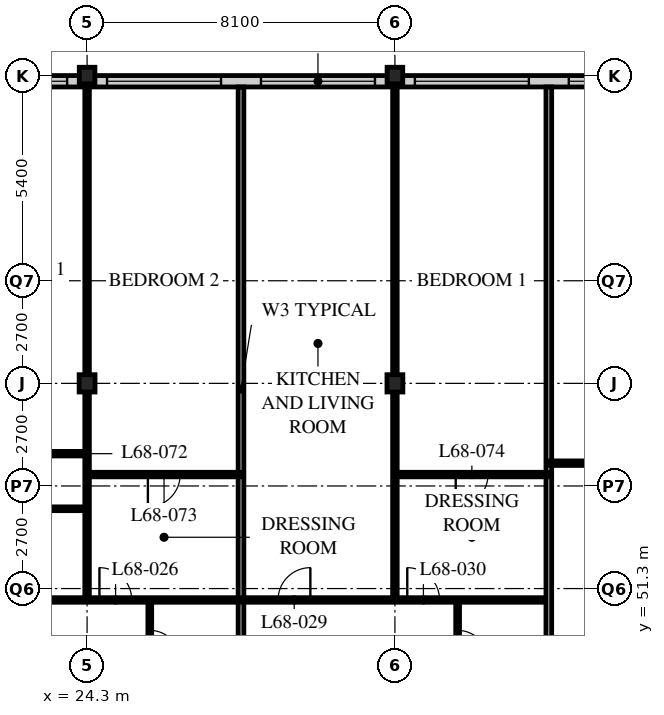
"""IFC4 building model, lengths in metres.
Left out: names, types, materials, properties, quantities, classifications, styles, units other than length and angle.
Written with IfcOpenShell. Run it as: python <this file> out.ifc"""

import sys

from ifc_helpers import new_model, si_unit, direction, frame, frame_2d, origin, origin_2d, place, context, subcontext, project, spatial, rectangle, i_section, extrude, element, fill, save


model = new_model("IFC4")
c1 = context("Model", 3, precision=1e-05, world=origin(), true_north=direction((0.0, 1.0)))
c2 = subcontext(c1, "Body", "Model", "MODEL_VIEW")
j1 = project(units=[si_unit("LENGTHUNIT", "METRE"), si_unit("PLANEANGLEUNIT", "RADIAN")], contexts=[c1])
p1 = place(None, origin())
s1 = spatial("IfcSite", under=j1, at=p1, CompositionType="ELEMENT")
p2 = place(p1, origin())
s2 = spatial("IfcBuilding", under=s1, at=p2, CompositionType="ELEMENT")
p3 = place(p2, frame((0.0, 0.0, 265.8)))
s3 = spatial("IfcBuildingStorey", under=s2, at=p3, CompositionType="ELEMENT", Elevation=265.8)
p4 = place(p3, frame((24.3, 56.7, 0.0), z_axis=(0.0, 0.0, 1.0), x_axis=(1.0, 0.0, 0.0)))
e1 = element("IfcColumn", 1, at=p4, inside=s3, PredefinedType="COLUMN", context=c2, shape_type="SweptSolid", body=[
    extrude(i_section(OverallWidth=0.418, OverallDepth=0.456, WebThickness=0.042, FlangeThickness=0.067, FilletRadius=0.015, at=origin_2d()), origin(), (0.0, 0.0, 1.0), 3.9),
])
p5 = place(p3, frame((24.3, 64.8, 0.0), z_axis=(0.0, 0.0, 1.0), x_axis=(1.0, 0.0, 0.0)))
e2 = element("IfcColumn", 2, at=p5, inside=s3, PredefinedType="COLUMN", context=c2, shape_type="SweptSolid", body=[
    extrude(i_section(OverallWidth=0.412, OverallDepth=0.437, WebThickness=0.036, FlangeThickness=0.058, FilletRadius=0.015, at=origin_2d()), origin(), (0.0, 0.0, 1.0), 3.9),
])
p6 = place(p3, frame((32.4, 56.7, 0.0), z_axis=(0.0, 0.0, 1.0), x_axis=(1.0, 0.0, 0.0)))
e3 = element("IfcColumn", 3, at=p6, inside=s3, PredefinedType="COLUMN", context=c2, shape_type="SweptSolid", body=[
    extrude(i_section(OverallWidth=0.418, OverallDepth=0.456, WebThickness=0.042, FlangeThickness=0.067, FilletRadius=0.015, at=origin_2d()), origin(), (0.0, 0.0, 1.0), 3.9),
])
p7 = place(p3, frame((32.4, 64.8, 0.0), z_axis=(0.0, 0.0, 1.0), x_axis=(1.0, 0.0, 0.0)))
e4 = element("IfcColumn", 4, at=p7, inside=s3, PredefinedType="COLUMN", context=c2, shape_type="SweptSolid", body=[
    extrude(i_section(OverallWidth=0.412, OverallDepth=0.437, WebThickness=0.036, FlangeThickness=0.058, FilletRadius=0.015, at=origin_2d()), origin(), (0.0, 0.0, 1.0), 3.9),
])
p8 = place(p3, frame((48.3, 64.65, 0.0), z_axis=(0.0, 0.0, 1.0), x_axis=(-1.0, 0.0, 0.0)))
e5 = element("IfcWall", 5, at=p8, inside=s3, PredefinedType="SOLIDWALL", context=c2, shape_type="SweptSolid", body=[
    extrude(rectangle(XDim=40.2, YDim=0.3, at=frame_2d((20.1, 0.0))), origin(), (0.0, 0.0, 1.0), 3.69),
])
p9 = place(p8, frame((0.225, 0.0, 0.6)))
e6 = element("IfcOpeningElement", 6, at=p9, cuts=e5, PredefinedType="OPENING", context=c2, shape_type="SweptSolid", body=[
    extrude(rectangle(XDim=3.0, YDim=2.4, at=frame_2d((1.5, 1.2))), frame((0.0, 0.16, 0.0), z_axis=(0.0, -1.0, 0.0), x_axis=(1.0, 0.0, 0.0)), (0.0, 0.0, 1.0), 0.32),
])
p10 = place(p8, frame((4.275, 0.0, 0.6)))
e7 = element("IfcOpeningElement", 7, at=p10, cuts=e5, PredefinedType="OPENING", context=c2, shape_type="SweptSolid", body=[
    extrude(rectangle(XDim=3.0, YDim=2.4, at=frame_2d((1.5, 1.2))), frame((0.0, 0.16, 0.0), z_axis=(0.0, -1.0, 0.0), x_axis=(1.0, 0.0, 0.0)), (0.0, 0.0, 1.0), 0.32),
])
p11 = place(p8, frame((8.325, 0.0, 0.6)))
e8 = element("IfcOpeningElement", 8, at=p11, cuts=e5, PredefinedType="OPENING", context=c2, shape_type="SweptSolid", body=[
    extrude(rectangle(XDim=3.0, YDim=2.4, at=frame_2d((1.5, 1.2))), frame((0.0, 0.16, 0.0), z_axis=(0.0, -1.0, 0.0), x_axis=(1.0, 0.0, 0.0)), (0.0, 0.0, 1.0), 0.32),
])
p12 = place(p8, frame((12.375, 0.0, 0.6)))
e9 = element("IfcOpeningElement", 9, at=p12, cuts=e5, PredefinedType="OPENING", context=c2, shape_type="SweptSolid", body=[
    extrude(rectangle(XDim=3.0, YDim=2.4, at=frame_2d((1.5, 1.2))), frame((0.0, 0.16, 0.0), z_axis=(0.0, -1.0, 0.0), x_axis=(1.0, 0.0, 0.0)), (0.0, 0.0, 1.0), 0.32),
])
p13 = place(p8, frame((16.425, 0.0, 0.6)))
e10 = element("IfcOpeningElement", 10, at=p13, cuts=e5, PredefinedType="OPENING", context=c2, shape_type="SweptSolid", body=[
    extrude(rectangle(XDim=3.0, YDim=2.4, at=frame_2d((1.5, 1.2))), frame((0.0, 0.16, 0.0), z_axis=(0.0, -1.0, 0.0), x_axis=(1.0, 0.0, 0.0)), (0.0, 0.0, 1.0), 0.32),
])
p14 = place(p8, frame((20.475, 0.0, 0.6)))
e11 = element("IfcOpeningElement", 11, at=p14, cuts=e5, PredefinedType="OPENING", context=c2, shape_type="SweptSolid", body=[
    extrude(rectangle(XDim=3.0, YDim=2.4, at=frame_2d((1.5, 1.2))), frame((0.0, 0.16, 0.0), z_axis=(0.0, -1.0, 0.0), x_axis=(1.0, 0.0, 0.0)), (0.0, 0.0, 1.0), 0.32),
])
p15 = place(p8, frame((24.525, 0.0, 0.6)))
e12 = element("IfcOpeningElement", 12, at=p15, cuts=e5, PredefinedType="OPENING", context=c2, shape_type="SweptSolid", body=[
    extrude(rectangle(XDim=3.0, YDim=2.4, at=frame_2d((1.5, 1.2))), frame((0.0, 0.16, 0.0), z_axis=(0.0, -1.0, 0.0), x_axis=(1.0, 0.0, 0.0)), (0.0, 0.0, 1.0), 0.32),
])
p16 = place(p8, frame((28.575, 0.0, 0.6)))
e13 = element("IfcOpeningElement", 13, at=p16, cuts=e5, PredefinedType="OPENING", context=c2, shape_type="SweptSolid", body=[
    extrude(rectangle(XDim=3.0, YDim=2.4, at=frame_2d((1.5, 1.2))), frame((0.0, 0.16, 0.0), z_axis=(0.0, -1.0, 0.0), x_axis=(1.0, 0.0, 0.0)), (0.0, 0.0, 1.0), 0.32),
])
p17 = place(p8, frame((32.625, 0.0, 0.6)))
e14 = element("IfcOpeningElement", 14, at=p17, cuts=e5, PredefinedType="OPENING", context=c2, shape_type="SweptSolid", body=[
    extrude(rectangle(XDim=3.0, YDim=2.4, at=frame_2d((1.5, 1.2))), frame((0.0, 0.16, 0.0), z_axis=(0.0, -1.0, 0.0), x_axis=(1.0, 0.0, 0.0)), (0.0, 0.0, 1.0), 0.32),
])
p18 = place(p8, frame((36.675, 0.0, 0.6)))
e15 = element("IfcOpeningElement", 15, at=p18, cuts=e5, PredefinedType="OPENING", context=c2, shape_type="SweptSolid", body=[
    extrude(rectangle(XDim=3.0, YDim=2.4, at=frame_2d((1.5, 1.2))), frame((0.0, 0.16, 0.0), z_axis=(0.0, -1.0, 0.0), x_axis=(1.0, 0.0, 0.0)), (0.0, 0.0, 1.0), 0.32),
])
p19 = place(p3, frame((25.95, 48.6, 0.0), z_axis=(0.0, 0.0, 1.0), x_axis=(0.0, 1.0, 0.0)))
e16 = element("IfcWall", 16, at=p19, inside=s3, PredefinedType="PARTITIONING", context=c2, shape_type="SweptSolid", body=[
    extrude(rectangle(XDim=2.4, YDim=0.1, at=frame_2d((1.2, 0.0))), origin(), (0.0, 0.0, 1.0), 3.69),
])
p20 = place(p19, frame((0.8, 0.0, 0.0)))
e17 = element("IfcOpeningElement", 17, at=p20, cuts=e16, PredefinedType="OPENING", context=c2, shape_type="SweptSolid", body=[
    extrude(rectangle(XDim=0.8, YDim=2.1, at=frame_2d((0.4, 1.05))), frame((0.0, 0.06, 0.0), z_axis=(0.0, -1.0, 0.0), x_axis=(1.0, 0.0, 0.0)), (0.0, 0.0, 1.0), 0.12),
])
p21 = place(p3, frame((22.0, 53.4, 0.0), z_axis=(0.0, 0.0, 1.0), x_axis=(1.0, 0.0, 0.0)))
e18 = element("IfcWall", 18, at=p21, inside=s3, PredefinedType="PARTITIONING", context=c2, shape_type="SweptSolid", body=[
    extrude(rectangle(XDim=2.3, YDim=0.1, at=frame_2d((1.15, 0.0))), origin(), (0.0, 0.0, 1.0), 3.69),
])
p22 = place(p3, frame((24.3, 51.0, 0.0), z_axis=(0.0, 0.0, 1.0), x_axis=(0.0, 1.0, 0.0)))
e19 = element("IfcWall", 19, at=p22, inside=s3, PredefinedType="PARTITIONING", context=c2, shape_type="SweptSolid", body=[
    extrude(rectangle(XDim=13.5, YDim=0.12, at=frame_2d((6.75, 0.0))), origin(), (0.0, 0.0, 1.0), 3.078),
])
p23 = place(p3, frame((28.35, 48.6, 0.0), z_axis=(0.0, 0.0, 1.0), x_axis=(0.0, 1.0, 0.0)))
e20 = element("IfcWall", 20, at=p23, inside=s3, PredefinedType="PARTITIONING", context=c2, shape_type="SweptSolid", body=[
    extrude(rectangle(XDim=15.9, YDim=0.15, at=frame_2d((7.95, 0.0))), origin(), (0.0, 0.0, 1.0), 3.69),
])
p24 = place(p3, frame((34.05, 48.6, 0.0), z_axis=(0.0, 0.0, 1.0), x_axis=(0.0, 1.0, 0.0)))
e21 = element("IfcWall", 21, at=p24, inside=s3, PredefinedType="PARTITIONING", context=c2, shape_type="SweptSolid", body=[
    extrude(rectangle(XDim=2.4, YDim=0.1, at=frame_2d((1.2, 0.0))), origin(), (0.0, 0.0, 1.0), 3.69),
])
p25 = place(p24, frame((0.8, 0.0, 0.0)))
e22 = element("IfcOpeningElement", 22, at=p25, cuts=e21, PredefinedType="OPENING", context=c2, shape_type="SweptSolid", body=[
    extrude(rectangle(XDim=0.8, YDim=2.1, at=frame_2d((0.4, 1.05))), frame((0.0, 0.06, 0.0), z_axis=(0.0, -1.0, 0.0), x_axis=(1.0, 0.0, 0.0)), (0.0, 0.0, 1.0), 0.12),
])
p26 = place(p3, frame((32.4, 51.0, 0.0), z_axis=(0.0, 0.0, 1.0), x_axis=(0.0, 1.0, 0.0)))
e23 = element("IfcWall", 23, at=p26, inside=s3, PredefinedType="PARTITIONING", context=c2, shape_type="SweptSolid", body=[
    extrude(rectangle(XDim=13.5, YDim=0.12, at=frame_2d((6.75, 0.0))), origin(), (0.0, 0.0, 1.0), 3.078),
])
p27 = place(p3, frame((4.1, 51.0, 0.0), z_axis=(0.0, 0.0, 1.0), x_axis=(1.0, 0.0, 0.0)))
e24 = element("IfcWall", 24, at=p27, inside=s3, PredefinedType="PARTITIONING", context=c2, shape_type="SweptSolid", body=[
    extrude(rectangle(XDim=32.35, YDim=0.12, at=frame_2d((16.175, 0.0))), origin(), (0.0, 0.0, 1.0), 3.69),
])
p28 = place(p27, frame((9.025, 0.0, 0.0)))
e25 = element("IfcOpeningElement", 25, at=p28, cuts=e24, PredefinedType="OPENING", context=c2, shape_type="SweptSolid", body=[
    extrude(rectangle(XDim=0.85, YDim=2.1, at=frame_2d((0.425, 1.05))), frame((0.0, 0.07, 0.0), z_axis=(0.0, -1.0, 0.0), x_axis=(1.0, 0.0, 0.0)), (0.0, 0.0, 1.0), 0.14),
])
p29 = place(p27, frame((16.475, 0.0, 0.0)))
e26 = element("IfcOpeningElement", 26, at=p29, cuts=e24, PredefinedType="OPENING", context=c2, shape_type="SweptSolid", body=[
    extrude(rectangle(XDim=0.85, YDim=2.1, at=frame_2d((0.425, 1.05))), frame((0.0, 0.07, 0.0), z_axis=(0.0, -1.0, 0.0), x_axis=(1.0, 0.0, 0.0)), (0.0, 0.0, 1.0), 0.14),
])
p30 = place(p27, frame((20.525, 0.0, 0.0)))
e27 = element("IfcOpeningElement", 27, at=p30, cuts=e24, PredefinedType="OPENING", context=c2, shape_type="SweptSolid", body=[
    extrude(rectangle(XDim=0.85, YDim=2.1, at=frame_2d((0.425, 1.05))), frame((0.0, 0.07, 0.0), z_axis=(0.0, -1.0, 0.0), x_axis=(1.0, 0.0, 0.0)), (0.0, 0.0, 1.0), 0.14),
])
p31 = place(p27, frame((25.225, 0.0, 0.0)))
e28 = element("IfcOpeningElement", 28, at=p31, cuts=e24, PredefinedType="OPENING", context=c2, shape_type="SweptSolid", body=[
    extrude(rectangle(XDim=0.85, YDim=2.1, at=frame_2d((0.425, 1.05))), frame((0.0, 0.07, 0.0), z_axis=(0.0, -1.0, 0.0), x_axis=(1.0, 0.0, 0.0)), (0.0, 0.0, 1.0), 0.14),
])
p32 = place(p27, frame((28.625, 0.0, 0.0)))
e29 = element("IfcOpeningElement", 29, at=p32, cuts=e24, PredefinedType="OPENING", context=c2, shape_type="SweptSolid", body=[
    extrude(rectangle(XDim=0.85, YDim=2.1, at=frame_2d((0.425, 1.05))), frame((0.0, 0.07, 0.0), z_axis=(0.0, -1.0, 0.0), x_axis=(1.0, 0.0, 0.0)), (0.0, 0.0, 1.0), 0.14),
])
p33 = place(p27, frame((6.725, 0.0, 0.0)))
e30 = element("IfcOpeningElement", 30, at=p33, cuts=e24, PredefinedType="OPENING", context=c2, shape_type="SweptSolid", body=[
    extrude(rectangle(XDim=0.85, YDim=2.1, at=frame_2d((0.425, 1.05))), frame((0.0, 0.07, 0.0), z_axis=(0.0, -1.0, 0.0), x_axis=(1.0, 0.0, 0.0)), (0.0, 0.0, 1.0), 0.14),
])
p34 = place(p27, frame((2.875, 0.0, 0.0)))
e31 = element("IfcOpeningElement", 31, at=p34, cuts=e24, PredefinedType="OPENING", context=c2, shape_type="SweptSolid", body=[
    extrude(rectangle(XDim=0.85, YDim=2.1, at=frame_2d((0.425, 1.05))), frame((0.0, 0.07, 0.0), z_axis=(0.0, -1.0, 0.0), x_axis=(1.0, 0.0, 0.0)), (0.0, 0.0, 1.0), 0.14),
])
p35 = place(p3, frame((36.45, 64.5, 0.0), z_axis=(0.0, 0.0, 1.0), x_axis=(0.0, -1.0, 0.0)))
e32 = element("IfcWall", 32, at=p35, inside=s3, PredefinedType="PARTITIONING", context=c2, shape_type="SweptSolid", body=[
    extrude(rectangle(XDim=15.9, YDim=0.15, at=frame_2d((7.95, 0.0))), origin(), (0.0, 0.0, 1.0), 3.69),
])
p36 = place(p3, frame((36.45, 54.6, 0.0), z_axis=(0.0, 0.0, 1.0), x_axis=(1.0, 0.0, 0.0)))
e33 = element("IfcWall", 33, at=p36, inside=s3, PredefinedType="PARTITIONING", context=c2, shape_type="SweptSolid", body=[
    extrude(rectangle(XDim=19.95, YDim=0.12, at=frame_2d((9.975, 0.0))), origin(), (0.0, 0.0, 1.0), 3.69),
])
p37 = place(p36, frame((1.675, 0.0, 0.0)))
e34 = element("IfcOpeningElement", 34, at=p37, cuts=e33, PredefinedType="OPENING", context=c2, shape_type="SweptSolid", body=[
    extrude(rectangle(XDim=0.85, YDim=2.1, at=frame_2d((0.425, 1.05))), frame((0.0, 0.07, 0.0), z_axis=(0.0, -1.0, 0.0), x_axis=(1.0, 0.0, 0.0)), (0.0, 0.0, 1.0), 0.14),
])
p38 = place(p3, frame((20.25, 54.85, 0.0), z_axis=(0.0, 0.0, 1.0), x_axis=(1.0, 0.0, 0.0)))
e35 = element("IfcWall", 35, at=p38, inside=s3, PredefinedType="PARTITIONING", context=c2, shape_type="SweptSolid", body=[
    extrude(rectangle(XDim=4.05, YDim=0.12, at=frame_2d((2.025, 0.0))), origin(), (0.0, 0.0, 1.0), 3.69),
])
p39 = place(p38, frame((1.6, 0.0, 0.0)))
e36 = element("IfcOpeningElement", 36, at=p39, cuts=e35, PredefinedType="OPENING", context=c2, shape_type="SweptSolid", body=[
    extrude(rectangle(XDim=0.85, YDim=2.1, at=frame_2d((0.425, 1.05))), frame((0.0, 0.07, 0.0), z_axis=(0.0, -1.0, 0.0), x_axis=(1.0, 0.0, 0.0)), (0.0, 0.0, 1.0), 0.14),
])
p40 = place(p3, frame((24.3, 54.3, 0.0), z_axis=(0.0, 0.0, 1.0), x_axis=(1.0, 0.0, 0.0)))
e37 = element("IfcWall", 37, at=p40, inside=s3, PredefinedType="PARTITIONING", context=c2, shape_type="SweptSolid", body=[
    extrude(rectangle(XDim=4.05, YDim=0.12, at=frame_2d((2.025, 0.0))), origin(), (0.0, 0.0, 1.0), 3.69),
])
p41 = place(p40, frame((1.6, 0.0, 0.0)))
e38 = element("IfcOpeningElement", 38, at=p41, cuts=e37, PredefinedType="OPENING", context=c2, shape_type="SweptSolid", body=[
    extrude(rectangle(XDim=0.85, YDim=2.1, at=frame_2d((0.425, 1.05))), frame((0.0, 0.07, 0.0), z_axis=(0.0, -1.0, 0.0), x_axis=(1.0, 0.0, 0.0)), (0.0, 0.0, 1.0), 0.14),
])
p42 = place(p3, frame((32.4, 54.3, 0.0), z_axis=(0.0, 0.0, 1.0), x_axis=(1.0, 0.0, 0.0)))
e39 = element("IfcWall", 39, at=p42, inside=s3, PredefinedType="PARTITIONING", context=c2, shape_type="SweptSolid", body=[
    extrude(rectangle(XDim=4.05, YDim=0.12, at=frame_2d((2.025, 0.0))), origin(), (0.0, 0.0, 1.0), 3.69),
])
p43 = place(p42, frame((1.6, 0.0, 0.0)))
e40 = element("IfcOpeningElement", 40, at=p43, cuts=e39, PredefinedType="OPENING", context=c2, shape_type="SweptSolid", body=[
    extrude(rectangle(XDim=0.85, YDim=2.1, at=frame_2d((0.425, 1.05))), frame((0.0, 0.07, 0.0), z_axis=(0.0, -1.0, 0.0), x_axis=(1.0, 0.0, 0.0)), (0.0, 0.0, 1.0), 0.14),
])
p44 = place(p11, origin())
e41 = element("IfcWindow", 41, at=p44, inside=s3, PartitioningType="SINGLE_PANEL", PredefinedType="WINDOW", context=c2, shape_type="SweptSolid", body=[
    extrude(rectangle(XDim=3.0, YDim=2.4, at=frame_2d((1.5, 1.2))), frame((0.0, 0.03, 0.0), z_axis=(0.0, -1.0, 0.0), x_axis=(1.0, 0.0, 0.0)), (0.0, 0.0, 1.0), 0.06),
])
fill(e8, e41)
p45 = place(p12, origin())
e42 = element("IfcWindow", 42, at=p45, inside=s3, PartitioningType="SINGLE_PANEL", PredefinedType="WINDOW", context=c2, shape_type="SweptSolid", body=[
    extrude(rectangle(XDim=3.0, YDim=2.4, at=frame_2d((1.5, 1.2))), frame((0.0, 0.03, 0.0), z_axis=(0.0, -1.0, 0.0), x_axis=(1.0, 0.0, 0.0)), (0.0, 0.0, 1.0), 0.06),
])
fill(e9, e42)
p46 = place(p13, origin())
e43 = element("IfcWindow", 43, at=p46, inside=s3, PartitioningType="SINGLE_PANEL", PredefinedType="WINDOW", context=c2, shape_type="SweptSolid", body=[
    extrude(rectangle(XDim=3.0, YDim=2.4, at=frame_2d((1.5, 1.2))), frame((0.0, 0.03, 0.0), z_axis=(0.0, -1.0, 0.0), x_axis=(1.0, 0.0, 0.0)), (0.0, 0.0, 1.0), 0.06),
])
fill(e10, e43)
p47 = place(p14, origin())
e44 = element("IfcWindow", 44, at=p47, inside=s3, PartitioningType="SINGLE_PANEL", PredefinedType="WINDOW", context=c2, shape_type="SweptSolid", body=[
    extrude(rectangle(XDim=3.0, YDim=2.4, at=frame_2d((1.5, 1.2))), frame((0.0, 0.03, 0.0), z_axis=(0.0, -1.0, 0.0), x_axis=(1.0, 0.0, 0.0)), (0.0, 0.0, 1.0), 0.06),
])
fill(e11, e44)
p48 = place(p15, origin())
e45 = element("IfcWindow", 45, at=p48, inside=s3, PartitioningType="SINGLE_PANEL", PredefinedType="WINDOW", context=c2, shape_type="SweptSolid", body=[
    extrude(rectangle(XDim=3.0, YDim=2.4, at=frame_2d((1.5, 1.2))), frame((0.0, 0.03, 0.0), z_axis=(0.0, -1.0, 0.0), x_axis=(1.0, 0.0, 0.0)), (0.0, 0.0, 1.0), 0.06),
])
fill(e12, e45)
p49 = place(p20, origin())
e46 = element("IfcDoor", 46, at=p49, inside=s3, OperationType="SINGLE_SWING_RIGHT", PredefinedType="DOOR", context=c2, shape_type="SweptSolid", body=[
    extrude(rectangle(XDim=0.8, YDim=2.1, at=frame_2d((0.4, 1.05))), frame((0.0, 0.025, 0.0), z_axis=(0.0, -1.0, 0.0), x_axis=(1.0, 0.0, 0.0)), (0.0, 0.0, 1.0), 0.05),
])
fill(e17, e46)
p50 = place(p30, origin())
e47 = element("IfcDoor", 47, at=p50, inside=s3, OperationType="SINGLE_SWING_LEFT", PredefinedType="DOOR", context=c2, shape_type="SweptSolid", body=[
    extrude(rectangle(XDim=0.85, YDim=2.1, at=frame_2d((0.425, 1.05))), frame((0.0, 0.025, 0.0), z_axis=(0.0, -1.0, 0.0), x_axis=(1.0, 0.0, 0.0)), (0.0, 0.0, 1.0), 0.05),
])
fill(e27, e47)
p51 = place(p25, origin())
e48 = element("IfcDoor", 48, at=p51, inside=s3, OperationType="SINGLE_SWING_RIGHT", PredefinedType="DOOR", context=c2, shape_type="SweptSolid", body=[
    extrude(rectangle(XDim=0.8, YDim=2.1, at=frame_2d((0.4, 1.05))), frame((0.0, 0.025, 0.0), z_axis=(0.0, -1.0, 0.0), x_axis=(1.0, 0.0, 0.0)), (0.0, 0.0, 1.0), 0.05),
])
fill(e22, e48)
p52 = place(p31, origin())
e49 = element("IfcDoor", 49, at=p52, inside=s3, OperationType="SINGLE_SWING_RIGHT", PredefinedType="DOOR", context=c2, shape_type="SweptSolid", body=[
    extrude(rectangle(XDim=0.85, YDim=2.1, at=frame_2d((0.425, 1.05))), frame((0.0, 0.025, 0.0), z_axis=(0.0, -1.0, 0.0), x_axis=(1.0, 0.0, 0.0)), (0.0, 0.0, 1.0), 0.05),
])
fill(e28, e49)
p53 = place(p32, origin())
e50 = element("IfcDoor", 50, at=p53, inside=s3, OperationType="SINGLE_SWING_LEFT", PredefinedType="DOOR", context=c2, shape_type="SweptSolid", body=[
    extrude(rectangle(XDim=0.85, YDim=2.1, at=frame_2d((0.425, 1.05))), frame((0.0, 0.025, 0.0), z_axis=(0.0, -1.0, 0.0), x_axis=(1.0, 0.0, 0.0)), (0.0, 0.0, 1.0), 0.05),
])
fill(e29, e50)
p54 = place(p41, origin())
e51 = element("IfcDoor", 51, at=p54, inside=s3, OperationType="SINGLE_SWING_RIGHT", PredefinedType="DOOR", context=c2, shape_type="SweptSolid", body=[
    extrude(rectangle(XDim=0.85, YDim=2.1, at=frame_2d((0.425, 1.05))), frame((0.0, 0.025, 0.0), z_axis=(0.0, -1.0, 0.0), x_axis=(1.0, 0.0, 0.0)), (0.0, 0.0, 1.0), 0.05),
])
fill(e38, e51)
p55 = place(p43, origin())
e52 = element("IfcDoor", 52, at=p55, inside=s3, OperationType="SINGLE_SWING_RIGHT", PredefinedType="DOOR", context=c2, shape_type="SweptSolid", body=[
    extrude(rectangle(XDim=0.85, YDim=2.1, at=frame_2d((0.425, 1.05))), frame((0.0, 0.025, 0.0), z_axis=(0.0, -1.0, 0.0), x_axis=(1.0, 0.0, 0.0)), (0.0, 0.0, 1.0), 0.05),
])
fill(e40, e52)
save(model, sys.argv[1])
